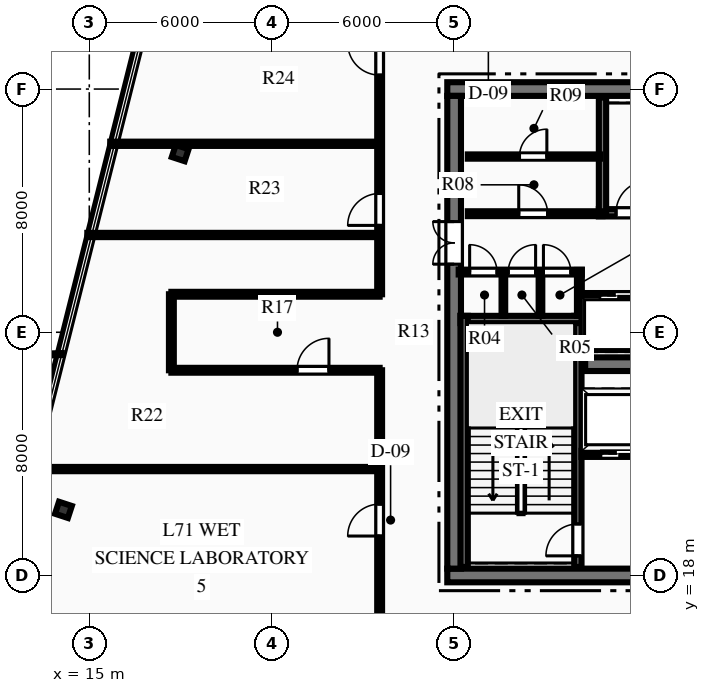
"""IFC4 building model, lengths in metres.
Left out: names, types, materials, properties, quantities, classifications, styles, units other than length and angle.
Written with IfcOpenShell. Run it as: python <this file> out.ifc"""

import sys

from ifc_helpers import new_model, si_unit, direction, frame, frame_2d, origin, origin_2d, place, context, subcontext, project, spatial, rectangle, i_section, extrude, element, fill, save


model = new_model("IFC4")
c1 = context("Model", 3, precision=1e-05, world=origin(), true_north=direction((0.0, 1.0)))
c2 = subcontext(c1, "Body", "Model", "MODEL_VIEW")
j1 = project(units=[si_unit("LENGTHUNIT", "METRE"), si_unit("PLANEANGLEUNIT", "RADIAN")], contexts=[c1])
p1 = place(None, origin())
s1 = spatial("IfcSite", under=j1, at=p1, CompositionType="ELEMENT")
p2 = place(p1, origin())
s2 = spatial("IfcBuilding", under=s1, at=p2, CompositionType="ELEMENT")
p3 = place(p2, frame((0.0, 0.0, 282.45)))
s3 = spatial("IfcBuildingStorey", under=s2, at=p3, CompositionType="ELEMENT", Elevation=282.45)
p4 = place(p3, frame((26.775, 18.0, 0.0), z_axis=(0.0, 0.0, 1.0), x_axis=(1.0, 0.0, 0.0)))
e1 = element("IfcWall", 1, at=p4, inside=s3, PredefinedType="SHEAR", context=c2, shape_type="SweptSolid", body=[
    extrude(rectangle(XDim=18.45, YDim=0.45, at=frame_2d((9.225, 0.0))), origin(), (0.0, 0.0, 1.0), 3.75),
])
p5 = place(p4, frame((7.325, 0.0, 0.0)))
e2 = element("IfcOpeningElement", 2, at=p5, cuts=e1, PredefinedType="OPENING", context=c2, shape_type="SweptSolid", body=[
    extrude(rectangle(XDim=1.1, YDim=2.15, at=frame_2d((0.55, 1.075))), frame((0.0, 0.235, 0.0), z_axis=(0.0, -1.0, 0.0), x_axis=(1.0, 0.0, 0.0)), (0.0, 0.0, 1.0), 0.47),
])
p6 = place(p4, frame((10.025, 0.0, 0.0)))
e3 = element("IfcOpeningElement", 3, at=p6, cuts=e1, PredefinedType="OPENING", context=c2, shape_type="SweptSolid", body=[
    extrude(rectangle(XDim=1.1, YDim=2.15, at=frame_2d((0.55, 1.075))), frame((0.0, 0.235, 0.0), z_axis=(0.0, -1.0, 0.0), x_axis=(1.0, 0.0, 0.0)), (0.0, 0.0, 1.0), 0.47),
])
p7 = place(p3, frame((26.775, 34.0, 0.0), z_axis=(0.0, 0.0, 1.0), x_axis=(1.0, 0.0, 0.0)))
e4 = element("IfcWall", 4, at=p7, inside=s3, PredefinedType="SHEAR", context=c2, shape_type="SweptSolid", body=[
    extrude(rectangle(XDim=18.45, YDim=0.45, at=frame_2d((9.225, 0.0))), origin(), (0.0, 0.0, 1.0), 3.75),
])
p8 = place(p3, frame((27.0, 18.225, 0.0), z_axis=(0.0, 0.0, 1.0), x_axis=(0.0, 1.0, 0.0)))
e5 = element("IfcWall", 5, at=p8, inside=s3, PredefinedType="SHEAR", context=c2, shape_type="SweptSolid", body=[
    extrude(rectangle(XDim=15.55, YDim=0.45, at=frame_2d((7.775, 0.0))), origin(), (0.0, 0.0, 1.0), 3.75),
])
p9 = place(p8, frame((10.015, 0.0, 0.0)))
e6 = element("IfcOpeningElement", 6, at=p9, cuts=e5, PredefinedType="OPENING", context=c2, shape_type="SweptSolid", body=[
    extrude(rectangle(XDim=1.4, YDim=2.2, at=frame_2d((0.7, 1.1))), frame((0.0, 0.235, 0.0), z_axis=(0.0, -1.0, 0.0), x_axis=(1.0, 0.0, 0.0)), (0.0, 0.0, 1.0), 0.47),
])
p10 = place(p3, frame((31.31, 24.95, 0.0), z_axis=(0.0, 0.0, 1.0), x_axis=(1.0, 0.0, 0.0)))
e7 = element("IfcWall", 7, at=p10, inside=s3, PredefinedType="SHEAR", context=c2, shape_type="SweptSolid", body=[
    extrude(rectangle(XDim=9.38, YDim=0.45, at=frame_2d((4.69, 0.0))), origin(), (0.0, 0.0, 1.0), 3.75),
])
p11 = place(p3, frame((31.07, 18.28, 0.0), z_axis=(0.0, 0.0, 1.0), x_axis=(0.0, 1.0, 0.0)))
e8 = element("IfcWall", 8, at=p11, inside=s3, PredefinedType="SHEAR", context=c2, shape_type="SweptSolid", body=[
    extrude(rectangle(XDim=8.26, YDim=0.24, at=frame_2d((4.13, 0.0))), origin(), (0.0, 0.0, 1.0), 3.75),
])
p12 = place(p11, frame((0.365, 0.0, 0.0)))
e9 = element("IfcOpeningElement", 9, at=p12, cuts=e8, PredefinedType="OPENING", context=c2, shape_type="SweptSolid", body=[
    extrude(rectangle(XDim=1.05, YDim=2.15, at=frame_2d((0.525, 1.075))), frame((0.0, 0.13, 0.0), z_axis=(0.0, -1.0, 0.0), x_axis=(1.0, 0.0, 0.0)), (0.0, 0.0, 1.0), 0.26),
])
p13 = place(p3, frame((27.21, 26.42, 0.0), z_axis=(0.0, 0.0, 1.0), x_axis=(1.0, 0.0, 0.0)))
e10 = element("IfcWall", 10, at=p13, inside=s3, PredefinedType="SHEAR", context=c2, shape_type="SweptSolid", body=[
    extrude(rectangle(XDim=3.98, YDim=0.24, at=frame_2d((1.99, 0.0))), origin(), (0.0, 0.0, 1.0), 3.75),
])
p14 = place(p3, frame((27.33, 18.28, 0.0), z_axis=(0.0, 0.0, 1.0), x_axis=(0.0, 1.0, 0.0)))
e11 = element("IfcWall", 11, at=p14, inside=s3, PredefinedType="SHEAR", context=c2, shape_type="SweptSolid", body=[
    extrude(rectangle(XDim=8.26, YDim=0.24, at=frame_2d((4.13, 0.0))), origin(), (0.0, 0.0, 1.0), 3.75),
])
p15 = place(p3, frame((31.76, 29.93, 0.0), z_axis=(0.0, 0.0, 1.0), x_axis=(1.0, 0.0, 0.0)))
e12 = element("IfcWall", 12, at=p15, inside=s3, PredefinedType="SHEAR", context=c2, shape_type="SweptSolid", body=[
    extrude(rectangle(XDim=8.38, YDim=0.24, at=frame_2d((4.19, 0.0))), origin(), (0.0, 0.0, 1.0), 3.75),
])
p16 = place(p15, frame((0.565, 0.0, 0.0)))
e13 = element("IfcOpeningElement", 13, at=p16, cuts=e12, PredefinedType="OPENING", context=c2, shape_type="SweptSolid", body=[
    extrude(rectangle(XDim=1.05, YDim=2.15, at=frame_2d((0.525, 1.075))), frame((0.0, 0.13, 0.0), z_axis=(0.0, -1.0, 0.0), x_axis=(1.0, 0.0, 0.0)), (0.0, 0.0, 1.0), 0.26),
])
p17 = place(p3, frame((31.88, 29.93, 0.0), z_axis=(0.0, 0.0, 1.0), x_axis=(0.0, 1.0, 0.0)))
e14 = element("IfcWall", 14, at=p17, inside=s3, PredefinedType="SHEAR", context=c2, shape_type="SweptSolid", body=[
    extrude(rectangle(XDim=3.79, YDim=0.24, at=frame_2d((1.895, 0.0))), origin(), (0.0, 0.0, 1.0), 3.75),
])
for number, where, z_axis, x_axis in (
    (15, (17.99, 31.894, 0.0), (0.0, 0.0, 1.0), (0.311, 0.95, 0.0)),
    (16, (14.149, 20.158, 0.0), (0.0, 0.0, 1.0), (0.311, 0.95, 0.0)),
):
    element("IfcColumn", number, at=place(p3, frame(where, z_axis=z_axis, x_axis=x_axis)), inside=s3, PredefinedType="COLUMN", context=c2, shape_type="SweptSolid", body=[
        extrude(i_section(OverallWidth=0.416, OverallDepth=0.445, WebThickness=0.039, FlangeThickness=0.063, at=origin_2d()), origin(), (0.0, 0.0, 1.0), 3.75),
    ])
p18 = place(p3, frame((31.19, 22.0, 0.0), z_axis=(0.0, 0.0, 1.0), x_axis=(1.0, 0.0, 0.0)))
e17 = element("IfcWall", 17, at=p18, inside=s3, PredefinedType="PARTITIONING", context=c2, shape_type="SweptSolid", body=[
    extrude(rectangle(XDim=4.69, YDim=0.2, at=frame_2d((2.345, 0.0))), origin(), (0.0, 0.0, 1.0), 3.48),
])
p19 = place(p18, frame((2.91, 0.0, 0.0)))
e18 = element("IfcOpeningElement", 18, at=p19, cuts=e17, PredefinedType="OPENING", context=c2, shape_type="SweptSolid", body=[
    extrude(rectangle(XDim=0.9, YDim=2.15, at=frame_2d((0.45, 1.075))), frame((0.0, 0.11, 0.0), z_axis=(0.0, -1.0, 0.0), x_axis=(1.0, 0.0, 0.0)), (0.0, 0.0, 1.0), 0.22),
])
p20 = place(p18, frame((0.635, 0.0, 0.0)))
e19 = element("IfcOpeningElement", 19, at=p20, cuts=e17, PredefinedType="OPENING", context=c2, shape_type="SweptSolid", body=[
    extrude(rectangle(XDim=1.1, YDim=2.15, at=frame_2d((0.55, 1.075))), frame((0.0, 0.11, 0.0), z_axis=(0.0, -1.0, 0.0), x_axis=(1.0, 0.0, 0.0)), (0.0, 0.0, 1.0), 0.22),
])
p21 = place(p3, frame((27.15, 27.98, 0.0), z_axis=(0.0, 0.0, 1.0), x_axis=(1.0, 0.0, 0.0)))
e20 = element("IfcWall", 20, at=p21, inside=s3, PredefinedType="PARTITIONING", context=c2, shape_type="SweptSolid", body=[
    extrude(rectangle(XDim=4.05, YDim=0.16, at=frame_2d((2.025, 0.0))), origin(), (0.0, 0.0, 1.0), 3.48),
])
p22 = place(p21, frame((0.36, 0.0, 0.0)))
e21 = element("IfcOpeningElement", 21, at=p22, cuts=e20, PredefinedType="OPENING", context=c2, shape_type="SweptSolid", body=[
    extrude(rectangle(XDim=0.9, YDim=2.15, at=frame_2d((0.45, 1.075))), frame((0.0, 0.09, 0.0), z_axis=(0.0, -1.0, 0.0), x_axis=(1.0, 0.0, 0.0)), (0.0, 0.0, 1.0), 0.18),
])
p23 = place(p21, frame((1.63, 0.0, 0.0)))
e22 = element("IfcOpeningElement", 22, at=p23, cuts=e20, PredefinedType="OPENING", context=c2, shape_type="SweptSolid", body=[
    extrude(rectangle(XDim=0.9, YDim=2.15, at=frame_2d((0.45, 1.075))), frame((0.0, 0.09, 0.0), z_axis=(0.0, -1.0, 0.0), x_axis=(1.0, 0.0, 0.0)), (0.0, 0.0, 1.0), 0.18),
])
p24 = place(p21, frame((2.788, 0.0, 0.0)))
e23 = element("IfcOpeningElement", 23, at=p24, cuts=e20, PredefinedType="OPENING", context=c2, shape_type="SweptSolid", body=[
    extrude(rectangle(XDim=0.9, YDim=2.15, at=frame_2d((0.45, 1.075))), frame((0.0, 0.09, 0.0), z_axis=(0.0, -1.0, 0.0), x_axis=(1.0, 0.0, 0.0)), (0.0, 0.0, 1.0), 0.18),
])
p25 = place(p3, frame((31.12, 26.54, 0.0), z_axis=(0.0, 0.0, 1.0), x_axis=(0.0, 1.0, 0.0)))
e24 = element("IfcWall", 24, at=p25, inside=s3, PredefinedType="PARTITIONING", context=c2, shape_type="SweptSolid", body=[
    extrude(rectangle(XDim=1.51, YDim=0.16, at=frame_2d((0.755, 0.0))), origin(), (0.0, 0.0, 1.0), 3.48),
])
for number, where, z_axis, x_axis in (
    (25, (28.62, 26.54, 0.0), (0.0, 0.0, 1.0), (0.0, 1.0, 0.0)),
    (26, (29.84, 26.54, 0.0), (0.0, 0.0, 1.0), (0.0, 1.0, 0.0)),
):
    element("IfcWall", number, at=place(p3, frame(where, z_axis=z_axis, x_axis=x_axis)), inside=s3, PredefinedType="PARTITIONING", context=c2, shape_type="SweptSolid", body=[
        extrude(rectangle(XDim=1.44, YDim=0.12, at=frame_2d((0.72, 0.0))), origin(), (0.0, 0.0, 1.0), 3.48),
    ])
p26 = place(p3, frame((27.45, 29.9, 0.0), z_axis=(0.0, 0.0, 1.0), x_axis=(1.0, 0.0, 0.0)))
e27 = element("IfcWall", 27, at=p26, inside=s3, PredefinedType="PARTITIONING", context=c2, shape_type="SweptSolid", body=[
    extrude(rectangle(XDim=4.43, YDim=0.16, at=frame_2d((2.215, 0.0))), origin(), (0.0, 0.0, 1.0), 3.48),
])
p27 = place(p26, frame((1.675, 0.0, 0.0)))
e28 = element("IfcOpeningElement", 28, at=p27, cuts=e27, PredefinedType="OPENING", context=c2, shape_type="SweptSolid", body=[
    extrude(rectangle(XDim=0.95, YDim=2.15, at=frame_2d((0.475, 1.075))), frame((0.0, 0.09, 0.0), z_axis=(0.0, -1.0, 0.0), x_axis=(1.0, 0.0, 0.0)), (0.0, 0.0, 1.0), 0.18),
])
p28 = place(p3, frame((27.45, 31.78, 0.0), z_axis=(0.0, 0.0, 1.0), x_axis=(1.0, 0.0, 0.0)))
e29 = element("IfcWall", 29, at=p28, inside=s3, PredefinedType="PARTITIONING", context=c2, shape_type="SweptSolid", body=[
    extrude(rectangle(XDim=4.35, YDim=0.14, at=frame_2d((2.175, 0.0))), origin(), (0.0, 0.0, 1.0), 3.48),
])
p29 = place(p28, frame((1.7, 0.0, 0.0)))
e30 = element("IfcOpeningElement", 30, at=p29, cuts=e29, PredefinedType="OPENING", context=c2, shape_type="SweptSolid", body=[
    extrude(rectangle(XDim=0.9, YDim=2.15, at=frame_2d((0.45, 1.075))), frame((0.0, 0.08, 0.0), z_axis=(0.0, -1.0, 0.0), x_axis=(1.0, 0.0, 0.0)), (0.0, 0.0, 1.0), 0.16),
])
p30 = place(p3, frame((31.2, 27.2, 0.0), z_axis=(0.0, 0.0, 1.0), x_axis=(1.0, 0.0, 0.0)))
e31 = element("IfcWall", 31, at=p30, inside=s3, PredefinedType="PARTITIONING", context=c2, shape_type="SweptSolid", body=[
    extrude(rectangle(XDim=9.6, YDim=0.18, at=frame_2d((4.8, 0.0))), origin(), (0.0, 0.0, 1.0), 3.48),
])
p31 = place(p30, frame((0.59, 0.0, 0.0)))
e32 = element("IfcOpeningElement", 32, at=p31, cuts=e31, PredefinedType="OPENING", context=c2, shape_type="SweptSolid", body=[
    extrude(rectangle(XDim=1.1, YDim=2.15, at=frame_2d((0.55, 1.075))), frame((0.0, 0.1, 0.0), z_axis=(0.0, -1.0, 0.0), x_axis=(1.0, 0.0, 0.0)), (0.0, 0.0, 1.0), 0.2),
])
p32 = place(p30, frame((2.99, 0.0, 0.0)))
e33 = element("IfcOpeningElement", 33, at=p32, cuts=e31, PredefinedType="OPENING", context=c2, shape_type="SweptSolid", body=[
    extrude(rectangle(XDim=1.1, YDim=2.15, at=frame_2d((0.55, 1.075))), frame((0.0, 0.1, 0.0), z_axis=(0.0, -1.0, 0.0), x_axis=(1.0, 0.0, 0.0)), (0.0, 0.0, 1.0), 0.2),
])
p33 = place(p30, frame((5.51, 0.0, 0.0)))
e34 = element("IfcOpeningElement", 34, at=p33, cuts=e31, PredefinedType="OPENING", context=c2, shape_type="SweptSolid", body=[
    extrude(rectangle(XDim=1.1, YDim=2.15, at=frame_2d((0.55, 1.075))), frame((0.0, 0.1, 0.0), z_axis=(0.0, -1.0, 0.0), x_axis=(1.0, 0.0, 0.0)), (0.0, 0.0, 1.0), 0.2),
])
p34 = place(p30, frame((7.91, 0.0, 0.0)))
e35 = element("IfcOpeningElement", 35, at=p34, cuts=e31, PredefinedType="OPENING", context=c2, shape_type="SweptSolid", body=[
    extrude(rectangle(XDim=1.1, YDim=2.15, at=frame_2d((0.55, 1.075))), frame((0.0, 0.1, 0.0), z_axis=(0.0, -1.0, 0.0), x_axis=(1.0, 0.0, 0.0)), (0.0, 0.0, 1.0), 0.2),
])
p35 = place(p3, frame((24.55, 15.55, 0.0), z_axis=(0.0, 0.0, 1.0), x_axis=(0.0, 1.0, 0.0)))
e36 = element("IfcWall", 36, at=p35, inside=s3, PredefinedType="PARTITIONING", context=c2, shape_type="SweptSolid", body=[
    extrude(rectangle(XDim=9.2, YDim=0.16, at=frame_2d((4.6, 0.0))), origin(), (0.0, 0.0, 1.0), 3.48),
])
p36 = place(p35, frame((3.747, 0.0, 0.0)))
e37 = element("IfcOpeningElement", 37, at=p36, cuts=e36, PredefinedType="OPENING", context=c2, shape_type="SweptSolid", body=[
    extrude(rectangle(XDim=1.05, YDim=2.15, at=frame_2d((0.525, 1.075))), frame((0.0, 0.09, 0.0), z_axis=(0.0, -1.0, 0.0), x_axis=(1.0, 0.0, 0.0)), (0.0, 0.0, 1.0), 0.18),
])
p37 = place(p3, frame((24.55, 27.25, 0.0), z_axis=(0.0, 0.0, 1.0), x_axis=(0.0, 1.0, 0.0)))
e38 = element("IfcWall", 38, at=p37, inside=s3, PredefinedType="PARTITIONING", context=c2, shape_type="SweptSolid", body=[
    extrude(rectangle(XDim=9.2, YDim=0.16, at=frame_2d((4.6, 0.0))), origin(), (0.0, 0.0, 1.0), 3.48),
])
p38 = place(p37, frame((2.265, 0.0, 0.0)))
e39 = element("IfcOpeningElement", 39, at=p38, cuts=e38, PredefinedType="OPENING", context=c2, shape_type="SweptSolid", body=[
    extrude(rectangle(XDim=1.05, YDim=2.15, at=frame_2d((0.525, 1.075))), frame((0.0, 0.09, 0.0), z_axis=(0.0, -1.0, 0.0), x_axis=(1.0, 0.0, 0.0)), (0.0, 0.0, 1.0), 0.18),
])
p39 = place(p37, frame((7.209, 0.0, 0.0)))
e40 = element("IfcOpeningElement", 40, at=p39, cuts=e38, PredefinedType="OPENING", context=c2, shape_type="SweptSolid", body=[
    extrude(rectangle(XDim=1.05, YDim=2.15, at=frame_2d((0.525, 1.075))), frame((0.0, 0.09, 0.0), z_axis=(0.0, -1.0, 0.0), x_axis=(1.0, 0.0, 0.0)), (0.0, 0.0, 1.0), 0.18),
])
p40 = place(p3, frame((17.7, 24.75, 0.0), z_axis=(0.0, 0.0, 1.0), x_axis=(1.0, 0.0, 0.0)))
e41 = element("IfcWall", 41, at=p40, inside=s3, PredefinedType="PARTITIONING", context=c2, shape_type="SweptSolid", body=[
    extrude(rectangle(XDim=6.85, YDim=0.16, at=frame_2d((3.425, 0.0))), origin(), (0.0, 0.0, 1.0), 3.48),
])
p41 = place(p40, frame((4.133, 0.0, 0.0)))
e42 = element("IfcOpeningElement", 42, at=p41, cuts=e41, PredefinedType="OPENING", context=c2, shape_type="SweptSolid", body=[
    extrude(rectangle(XDim=1.05, YDim=2.15, at=frame_2d((0.525, 1.075))), frame((0.0, 0.09, 0.0), z_axis=(0.0, -1.0, 0.0), x_axis=(1.0, 0.0, 0.0)), (0.0, 0.0, 1.0), 0.18),
])
p42 = place(p3, frame((17.7, 27.25, 0.0), z_axis=(0.0, 0.0, 1.0), x_axis=(1.0, 0.0, 0.0)))
e43 = element("IfcWall", 43, at=p42, inside=s3, PredefinedType="PARTITIONING", context=c2, shape_type="SweptSolid", body=[
    extrude(rectangle(XDim=6.85, YDim=0.16, at=frame_2d((3.425, 0.0))), origin(), (0.0, 0.0, 1.0), 3.48),
])
p43 = place(p3, frame((17.7, 24.75, 0.0), z_axis=(0.0, 0.0, 1.0), x_axis=(0.0, 1.0, 0.0)))
e44 = element("IfcWall", 44, at=p43, inside=s3, PredefinedType="PARTITIONING", context=c2, shape_type="SweptSolid", body=[
    extrude(rectangle(XDim=2.5, YDim=0.16, at=frame_2d((1.25, 0.0))), origin(), (0.0, 0.0, 1.0), 3.48),
])
p44 = place(p3, frame((13.001, 21.5, 0.0), z_axis=(0.0, 0.0, 1.0), x_axis=(1.0, 0.0, 0.0)))
e45 = element("IfcWall", 45, at=p44, inside=s3, PredefinedType="PARTITIONING", context=c2, shape_type="SweptSolid", body=[
    extrude(rectangle(XDim=11.549, YDim=0.14, at=frame_2d((5.775, 0.0))), origin(), (0.0, 0.0, 1.0), 3.48),
])
p45 = place(p3, frame((14.935, 29.2, 0.0), z_axis=(0.0, 0.0, 1.0), x_axis=(1.0, 0.0, 0.0)))
e46 = element("IfcWall", 46, at=p45, inside=s3, PredefinedType="PARTITIONING", context=c2, shape_type="SweptSolid", body=[
    extrude(rectangle(XDim=9.615, YDim=0.14, at=frame_2d((4.808, 0.0))), origin(), (0.0, 0.0, 1.0), 3.48),
])
p46 = place(p3, frame((15.688, 32.2, 0.0), z_axis=(0.0, 0.0, 1.0), x_axis=(1.0, 0.0, 0.0)))
e47 = element("IfcWall", 47, at=p46, inside=s3, PredefinedType="PARTITIONING", context=c2, shape_type="SweptSolid", body=[
    extrude(rectangle(XDim=8.862, YDim=0.14, at=frame_2d((4.431, 0.0))), origin(), (0.0, 0.0, 1.0), 2.858),
])
p47 = place(p22, origin())
e48 = element("IfcDoor", 48, at=p47, inside=s3, OperationType="SINGLE_SWING_LEFT", PredefinedType="DOOR", context=c2, shape_type="SweptSolid", body=[
    extrude(rectangle(XDim=0.9, YDim=2.15, at=frame_2d((0.45, 1.075))), frame((0.0, 0.025, 0.0), z_axis=(0.0, -1.0, 0.0), x_axis=(1.0, 0.0, 0.0)), (0.0, 0.0, 1.0), 0.05),
])
fill(e21, e48)
p48 = place(p23, origin())
e49 = element("IfcDoor", 49, at=p48, inside=s3, OperationType="SINGLE_SWING_RIGHT", PredefinedType="DOOR", context=c2, shape_type="SweptSolid", body=[
    extrude(rectangle(XDim=0.9, YDim=2.15, at=frame_2d((0.45, 1.075))), frame((0.0, 0.025, 0.0), z_axis=(0.0, -1.0, 0.0), x_axis=(1.0, 0.0, 0.0)), (0.0, 0.0, 1.0), 0.05),
])
fill(e22, e49)
p49 = place(p24, origin())
e50 = element("IfcDoor", 50, at=p49, inside=s3, OperationType="SINGLE_SWING_LEFT", PredefinedType="DOOR", context=c2, shape_type="SweptSolid", body=[
    extrude(rectangle(XDim=0.9, YDim=2.15, at=frame_2d((0.45, 1.075))), frame((0.0, 0.025, 0.0), z_axis=(0.0, -1.0, 0.0), x_axis=(1.0, 0.0, 0.0)), (0.0, 0.0, 1.0), 0.05),
])
fill(e23, e50)
p50 = place(p27, origin())
e51 = element("IfcDoor", 51, at=p50, inside=s3, OperationType="SINGLE_SWING_LEFT", PredefinedType="DOOR", context=c2, shape_type="SweptSolid", body=[
    extrude(rectangle(XDim=0.95, YDim=2.15, at=frame_2d((0.475, 1.075))), frame((0.0, 0.025, 0.0), z_axis=(0.0, -1.0, 0.0), x_axis=(1.0, 0.0, 0.0)), (0.0, 0.0, 1.0), 0.05),
])
fill(e28, e51)
p51 = place(p29, origin())
e52 = element("IfcDoor", 52, at=p51, inside=s3, OperationType="SINGLE_SWING_RIGHT", PredefinedType="DOOR", context=c2, shape_type="SweptSolid", body=[
    extrude(rectangle(XDim=0.9, YDim=2.15, at=frame_2d((0.45, 1.075))), frame((0.0, 0.025, 0.0), z_axis=(0.0, -1.0, 0.0), x_axis=(1.0, 0.0, 0.0)), (0.0, 0.0, 1.0), 0.05),
])
fill(e30, e52)
p52 = place(p12, origin())
e53 = element("IfcDoor", 53, at=p52, inside=s3, OperationType="SINGLE_SWING_LEFT", PredefinedType="DOOR", context=c2, shape_type="SweptSolid", body=[
    extrude(rectangle(XDim=1.05, YDim=2.15, at=frame_2d((0.525, 1.075))), frame((0.0, 0.025, 0.0), z_axis=(0.0, -1.0, 0.0), x_axis=(1.0, 0.0, 0.0)), (0.0, 0.0, 1.0), 0.05),
])
fill(e9, e53)
p53 = place(p16, origin())
e54 = element("IfcDoor", 54, at=p53, inside=s3, OperationType="SINGLE_SWING_RIGHT", PredefinedType="DOOR", context=c2, shape_type="SweptSolid", body=[
    extrude(rectangle(XDim=1.05, YDim=2.15, at=frame_2d((0.525, 1.075))), frame((0.0, 0.025, 0.0), z_axis=(0.0, -1.0, 0.0), x_axis=(1.0, 0.0, 0.0)), (0.0, 0.0, 1.0), 0.05),
])
fill(e13, e54)
p54 = place(p9, origin())
e55 = element("IfcDoor", 55, at=p54, inside=s3, OperationType="DOUBLE_DOOR_SINGLE_SWING", PredefinedType="DOOR", context=c2, shape_type="SweptSolid", body=[
    extrude(rectangle(XDim=1.4, YDim=2.2, at=frame_2d((0.7, 1.1))), frame((0.0, 0.025, 0.0), z_axis=(0.0, -1.0, 0.0), x_axis=(1.0, 0.0, 0.0)), (0.0, 0.0, 1.0), 0.05),
])
fill(e6, e55)
p55 = place(p36, origin())
e56 = element("IfcDoor", 56, at=p55, inside=s3, OperationType="SINGLE_SWING_LEFT", PredefinedType="DOOR", context=c2, shape_type="SweptSolid", body=[
    extrude(rectangle(XDim=1.05, YDim=2.15, at=frame_2d((0.525, 1.075))), frame((0.0, 0.025, 0.0), z_axis=(0.0, -1.0, 0.0), x_axis=(1.0, 0.0, 0.0)), (0.0, 0.0, 1.0), 0.05),
])
fill(e37, e56)
p56 = place(p41, origin())
e57 = element("IfcDoor", 57, at=p56, inside=s3, OperationType="SINGLE_SWING_RIGHT", PredefinedType="DOOR", context=c2, shape_type="SweptSolid", body=[
    extrude(rectangle(XDim=1.05, YDim=2.15, at=frame_2d((0.525, 1.075))), frame((0.0, 0.025, 0.0), z_axis=(0.0, -1.0, 0.0), x_axis=(1.0, 0.0, 0.0)), (0.0, 0.0, 1.0), 0.05),
])
fill(e42, e57)
p57 = place(p38, origin())
e58 = element("IfcDoor", 58, at=p57, inside=s3, OperationType="SINGLE_SWING_LEFT", PredefinedType="DOOR", context=c2, shape_type="SweptSolid", body=[
    extrude(rectangle(XDim=1.05, YDim=2.15, at=frame_2d((0.525, 1.075))), frame((0.0, 0.025, 0.0), z_axis=(0.0, -1.0, 0.0), x_axis=(1.0, 0.0, 0.0)), (0.0, 0.0, 1.0), 0.05),
])
fill(e39, e58)
p58 = place(p39, origin())
e59 = element("IfcDoor", 59, at=p58, inside=s3, OperationType="SINGLE_SWING_RIGHT", PredefinedType="DOOR", context=c2, shape_type="SweptSolid", body=[
    extrude(rectangle(XDim=1.05, YDim=2.15, at=frame_2d((0.525, 1.075))), frame((0.0, 0.025, 0.0), z_axis=(0.0, -1.0, 0.0), x_axis=(1.0, 0.0, 0.0)), (0.0, 0.0, 1.0), 0.05),
])
fill(e40, e59)
p59 = place(p31, origin())
e60 = element("IfcDoor", 60, at=p59, inside=s3, OperationType="SLIDING_TO_LEFT", PredefinedType="DOOR", context=c2, shape_type="SweptSolid", body=[
    extrude(rectangle(XDim=1.1, YDim=2.15, at=frame_2d((0.55, 1.075))), frame((0.0, 0.025, 0.0), z_axis=(0.0, -1.0, 0.0), x_axis=(1.0, 0.0, 0.0)), (0.0, 0.0, 1.0), 0.05),
])
fill(e32, e60)
p60 = place(p20, origin())
e61 = element("IfcDoor", 61, at=p60, inside=s3, OperationType="SLIDING_TO_LEFT", PredefinedType="DOOR", context=c2, shape_type="SweptSolid", body=[
    extrude(rectangle(XDim=1.1, YDim=2.15, at=frame_2d((0.55, 1.075))), frame((0.0, 0.025, 0.0), z_axis=(0.0, -1.0, 0.0), x_axis=(1.0, 0.0, 0.0)), (0.0, 0.0, 1.0), 0.05),
])
fill(e19, e61)
save(model, sys.argv[1])
